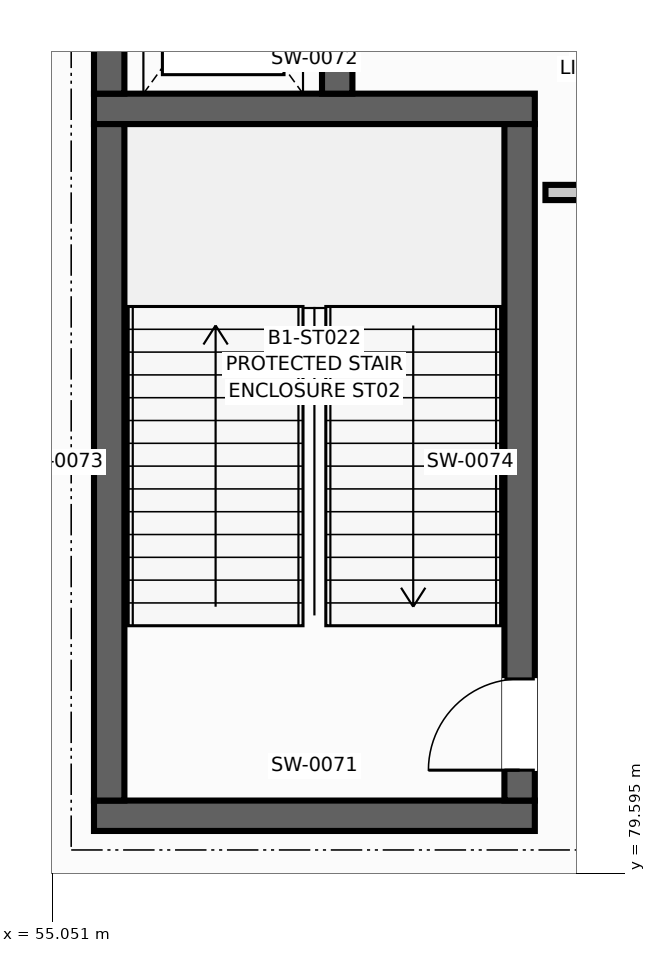
"""IFC4 building model, lengths in metres.
Left out: names, types, materials, properties, quantities, classifications, styles, units other than length and angle.
Written with IfcOpenShell. Run it as: python <this file> out.ifc"""

import sys

from ifc_helpers import new_model, si_unit, direction, frame, frame_2d, origin, place, context, subcontext, project, spatial, rectangle, extrude, element, fill, save


model = new_model("IFC4")
c1 = context("Model", 3, precision=1e-05, world=origin(), true_north=direction((0.0, 1.0)))
c2 = subcontext(c1, "Body", "Model", "MODEL_VIEW")
j1 = project(units=[si_unit("LENGTHUNIT", "METRE"), si_unit("PLANEANGLEUNIT", "RADIAN")], contexts=[c1])
p1 = place(None, origin())
s1 = spatial("IfcSite", under=j1, at=p1, CompositionType="ELEMENT")
p2 = place(p1, origin())
s2 = spatial("IfcBuilding", under=s1, at=p2, CompositionType="ELEMENT")
p3 = place(p2, frame((0.0, 0.0, -4.5)))
s3 = spatial("IfcBuildingStorey", under=s2, at=p3, CompositionType="ELEMENT", Elevation=-4.5)
p4 = place(p3, frame((56.431, 102.0, 0.0), z_axis=(0.0, 0.0, 1.0), x_axis=(-0.382656941645, -0.923890504882, 0.0)))
e1 = element("IfcWall", 1, at=p4, inside=s3, PredefinedType="USERDEFINED", context=c2, shape_type="SweptSolid", body=[
    extrude(rectangle(XDim=12.531, YDim=0.54, at=frame_2d((6.265, 0.0))), origin(), (0.0, 0.0, 1.0), 4.225),
])
for number, where, z_axis, x_axis in (
    (2, (55.6, 80.35, 0.0), (0.0, 0.0, 1.0), (1.0, 0.0, 0.0)),
    (3, (55.6, 89.65, 0.0), (0.0, 0.0, 1.0), (1.0, 0.0, 0.0)),
):
    element("IfcWall", number, at=place(p3, frame(where, z_axis=z_axis, x_axis=x_axis)), inside=s3, PredefinedType="SHEAR", context=c2, shape_type="SweptSolid", body=[
        extrude(rectangle(XDim=5.8, YDim=0.4, at=frame_2d((2.9, 0.0))), origin(), (0.0, 0.0, 1.0), 4.225),
    ])
p5 = place(p3, frame((55.8, 80.55, 0.0), z_axis=(0.0, 0.0, 1.0), x_axis=(0.0, 1.0, 0.0)))
e4 = element("IfcWall", 4, at=p5, inside=s3, PredefinedType="SHEAR", context=c2, shape_type="SweptSolid", body=[
    extrude(rectangle(XDim=8.9, YDim=0.4, at=frame_2d((4.45, 0.0))), origin(), (0.0, 0.0, 1.0), 4.225),
])
p6 = place(p3, frame((61.2, 80.55, 0.0), z_axis=(0.0, 0.0, 1.0), x_axis=(0.0, 1.0, 0.0)))
e5 = element("IfcWall", 5, at=p6, inside=s3, PredefinedType="SHEAR", context=c2, shape_type="SweptSolid", body=[
    extrude(rectangle(XDim=8.9, YDim=0.4, at=frame_2d((4.45, 0.0))), origin(), (0.0, 0.0, 1.0), 4.225),
])
p7 = place(p6, frame((0.4, 0.0, 0.0)))
e6 = element("IfcOpeningElement", 6, at=p7, cuts=e5, PredefinedType="OPENING", context=c2, shape_type="SweptSolid", body=[
    extrude(rectangle(XDim=1.2, YDim=2.2, at=frame_2d((0.6, 1.1))), frame((0.0, 0.21, 0.0), z_axis=(0.0, -1.0, 0.0), x_axis=(1.0, 0.0, 0.0)), (0.0, 0.0, 1.0), 0.42),
])
p8 = place(p3, frame((55.8, 89.85, 0.0), z_axis=(0.0, 0.0, 1.0), x_axis=(0.0, 1.0, 0.0)))
e7 = element("IfcWall", 7, at=p8, inside=s3, PredefinedType="SHEAR", context=c2, shape_type="SweptSolid", body=[
    extrude(rectangle(XDim=2.9, YDim=0.4, at=frame_2d((1.45, 0.0))), origin(), (0.0, 0.0, 1.0), 4.225),
])
p9 = place(p3, frame((58.8, 89.85, 0.0), z_axis=(0.0, 0.0, 1.0), x_axis=(0.0, 1.0, 0.0)))
e8 = element("IfcWall", 8, at=p9, inside=s3, PredefinedType="SHEAR", context=c2, shape_type="SweptSolid", body=[
    extrude(rectangle(XDim=2.9, YDim=0.4, at=frame_2d((1.45, 0.0))), origin(), (0.0, 0.0, 1.0), 4.225),
])
p10 = place(p9, frame((0.9, 0.0, 0.0)))
e9 = element("IfcOpeningElement", 9, at=p10, cuts=e8, PredefinedType="OPENING", context=c2, shape_type="SweptSolid", body=[
    extrude(rectangle(XDim=1.1, YDim=2.2, at=frame_2d((0.55, 1.1))), frame((0.0, 0.21, 0.0), z_axis=(0.0, -1.0, 0.0), x_axis=(1.0, 0.0, 0.0)), (0.0, 0.0, 1.0), 0.42),
])
p11 = place(p3, frame((61.54, 88.55, 0.0), z_axis=(0.0, 0.0, 1.0), x_axis=(1.0, 0.0, 0.0)))
e10 = element("IfcWall", 10, at=p11, inside=s3, PredefinedType="PARTITIONING", context=c2, shape_type="SweptSolid", body=[
    extrude(rectangle(XDim=4.18, YDim=0.2, at=frame_2d((2.09, 0.0))), origin(), (0.0, 0.0, 1.0), 3.22),
])
p12 = place(p7, origin())
e11 = element("IfcDoor", 11, at=p12, inside=s3, OperationType="SINGLE_SWING_LEFT", PredefinedType="DOOR", context=c2, shape_type="SweptSolid", body=[
    extrude(rectangle(XDim=1.2, YDim=2.2, at=frame_2d((0.6, 1.1))), frame((0.0, 0.025, 0.0), z_axis=(0.0, -1.0, 0.0), x_axis=(1.0, 0.0, 0.0)), (0.0, 0.0, 1.0), 0.05),
])
fill(e6, e11)
save(model, sys.argv[1])
